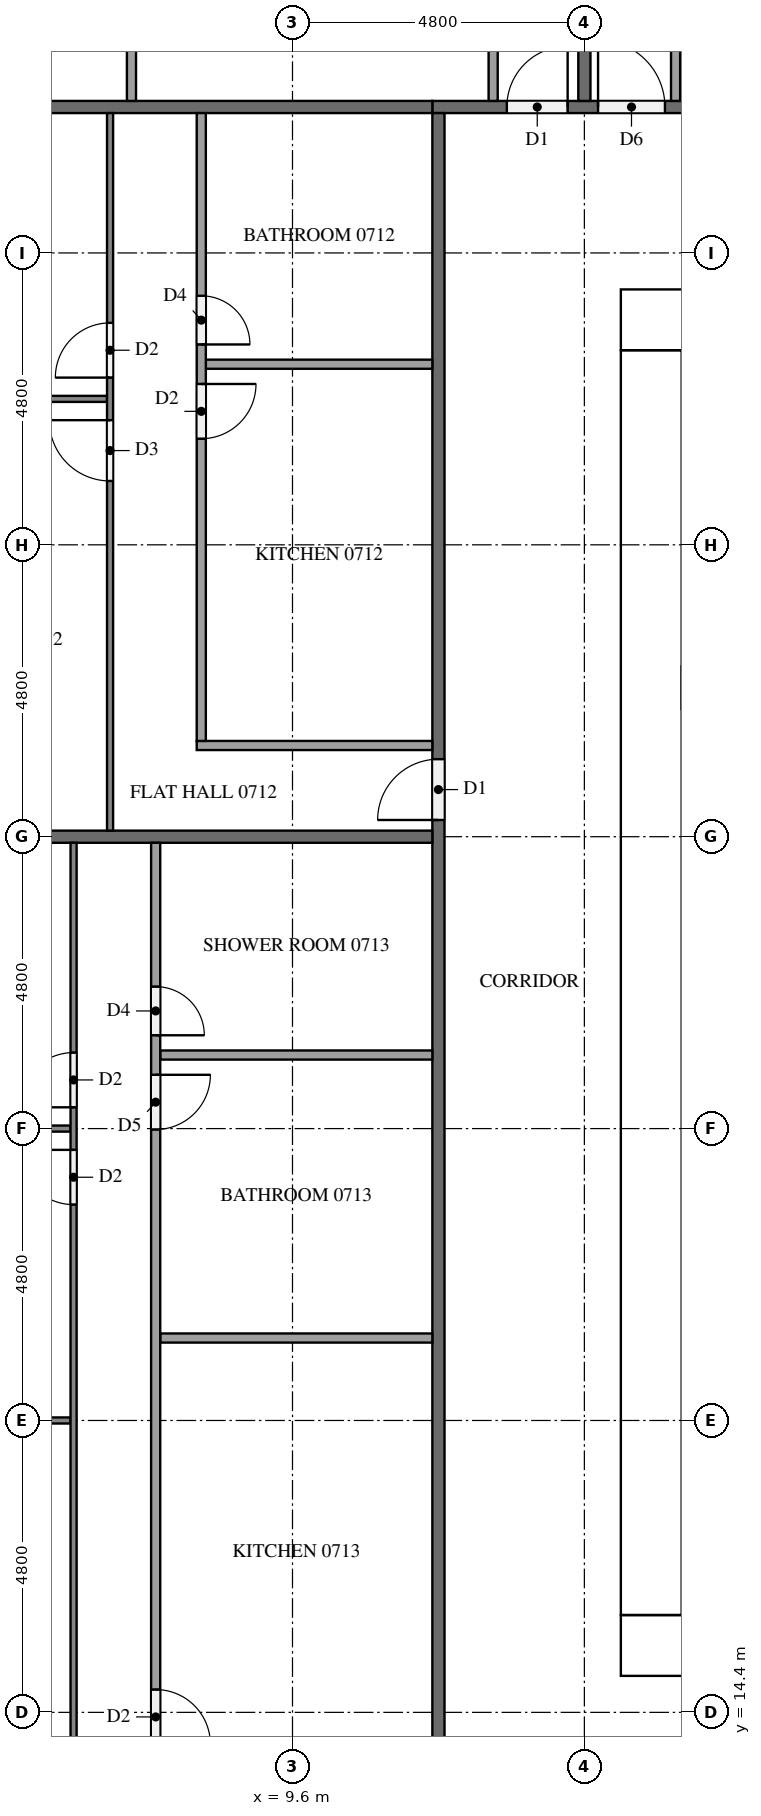
"""IFC4 building model, lengths in metres.
Left out: names, types, materials, properties, quantities, classifications, styles, units other than length and angle.
Written with IfcOpenShell. Run it as: python <this file> out.ifc"""

import sys

from ifc_helpers import new_model, si_unit, direction, frame, frame_2d, origin, place, context, subcontext, project, spatial, rectangle, extrude, element, fill, save


model = new_model("IFC4")
c1 = context("Model", 3, precision=1e-05, world=origin(), true_north=direction((0.0, 1.0)))
c2 = subcontext(c1, "Body", "Model", "MODEL_VIEW")
j1 = project(units=[si_unit("LENGTHUNIT", "METRE"), si_unit("PLANEANGLEUNIT", "RADIAN")], contexts=[c1])
p1 = place(None, origin())
s1 = spatial("IfcSite", under=j1, at=p1, CompositionType="ELEMENT")
p2 = place(p1, origin())
s2 = spatial("IfcBuilding", under=s1, at=p2, CompositionType="ELEMENT")
p3 = place(p2, frame((0.0, 0.0, 32.9)))
s3 = spatial("IfcBuildingStorey", under=s2, at=p3, CompositionType="ELEMENT", Elevation=32.9)
p4 = place(p3, frame((15.0, 15.5, 0.0), z_axis=(0.0, 0.0, 1.0), x_axis=(1.0, 0.0, 0.0)))
e1 = element("IfcWall", 1, at=p4, inside=s3, PredefinedType="SHEAR", context=c2, shape_type="SweptSolid", body=[
    extrude(rectangle(XDim=32.4, YDim=1.0, at=frame_2d((16.2, 0.0))), origin(), (0.0, 0.0, 1.0), 3.2),
])
p5 = place(p4, frame((15.3, 0.0, 0.0)))
e2 = element("IfcOpeningElement", 2, at=p5, cuts=e1, PredefinedType="OPENING", context=c2, shape_type="SweptSolid", body=[
    extrude(rectangle(XDim=1.8, YDim=2.1, at=frame_2d((0.9, 1.05))), frame((0.0, 0.51, 0.0), z_axis=(0.0, -1.0, 0.0), x_axis=(1.0, 0.0, 0.0)), (0.0, 0.0, 1.0), 1.02),
])
p6 = place(p3, frame((15.0, 37.3, 0.0), z_axis=(0.0, 0.0, 1.0), x_axis=(1.0, 0.0, 0.0)))
e3 = element("IfcWall", 3, at=p6, inside=s3, PredefinedType="SHEAR", context=c2, shape_type="SweptSolid", body=[
    extrude(rectangle(XDim=32.4, YDim=1.0, at=frame_2d((16.2, 0.0))), origin(), (0.0, 0.0, 1.0), 3.2),
])
p7 = place(p6, frame((15.3, 0.0, 0.0)))
e4 = element("IfcOpeningElement", 4, at=p7, cuts=e3, PredefinedType="OPENING", context=c2, shape_type="SweptSolid", body=[
    extrude(rectangle(XDim=1.8, YDim=2.1, at=frame_2d((0.9, 1.05))), frame((0.0, 0.51, 0.0), z_axis=(0.0, -1.0, 0.0), x_axis=(1.0, 0.0, 0.0)), (0.0, 0.0, 1.0), 1.02),
])
p8 = place(p6, frame((1.766, 0.0, 0.0)))
e5 = element("IfcOpeningElement", 5, at=p8, cuts=e3, PredefinedType="OPENING", context=c2, shape_type="SweptSolid", body=[
    extrude(rectangle(XDim=1.0, YDim=2.1, at=frame_2d((0.5, 1.05))), frame((0.0, 0.51, 0.0), z_axis=(0.0, -1.0, 0.0), x_axis=(1.0, 0.0, 0.0)), (0.0, 0.0, 1.0), 1.02),
])
p9 = place(p6, frame((5.241, 0.0, 0.0)))
e6 = element("IfcOpeningElement", 6, at=p9, cuts=e3, PredefinedType="OPENING", context=c2, shape_type="SweptSolid", body=[
    extrude(rectangle(XDim=1.0, YDim=2.1, at=frame_2d((0.5, 1.05))), frame((0.0, 0.51, 0.0), z_axis=(0.0, -1.0, 0.0), x_axis=(1.0, 0.0, 0.0)), (0.0, 0.0, 1.0), 1.02),
])
p10 = place(p3, frame((15.5, 16.0, 0.0), z_axis=(0.0, 0.0, 1.0), x_axis=(0.0, 1.0, 0.0)))
e7 = element("IfcWall", 7, at=p10, inside=s3, PredefinedType="SHEAR", context=c2, shape_type="SweptSolid", body=[
    extrude(rectangle(XDim=20.8, YDim=1.0, at=frame_2d((10.4, 0.0))), origin(), (0.0, 0.0, 1.0), 3.2),
])
p11 = place(p10, frame((4.76, 0.0, 0.0)))
e8 = element("IfcOpeningElement", 8, at=p11, cuts=e7, PredefinedType="OPENING", context=c2, shape_type="SweptSolid", body=[
    extrude(rectangle(XDim=1.2, YDim=2.1, at=frame_2d((0.6, 1.05))), frame((0.0, 0.51, 0.0), z_axis=(0.0, -1.0, 0.0), x_axis=(1.0, 0.0, 0.0)), (0.0, 0.0, 1.0), 1.02),
])
p12 = place(p3, frame((11.9, 40.8, 0.0), z_axis=(0.0, 0.0, 1.0), x_axis=(1.0, 0.0, 0.0)))
e9 = element("IfcWall", 9, at=p12, inside=s3, PredefinedType="PARTITIONING", context=c2, shape_type="SweptSolid", body=[
    extrude(rectangle(XDim=38.6, YDim=0.2, at=frame_2d((19.3, 0.0))), origin(), (0.0, 0.0, 1.0), 3.2),
])
p13 = place(p12, frame((37.225, 0.0, 0.0)))
e10 = element("IfcOpeningElement", 10, at=p13, cuts=e9, PredefinedType="OPENING", context=c2, shape_type="SweptSolid", body=[
    extrude(rectangle(XDim=1.0, YDim=2.1, at=frame_2d((0.5, 1.05))), frame((0.0, 0.11, 0.0), z_axis=(0.0, -1.0, 0.0), x_axis=(1.0, 0.0, 0.0)), (0.0, 0.0, 1.0), 0.22),
])
p14 = place(p12, frame((30.025, 0.0, 0.0)))
e11 = element("IfcOpeningElement", 11, at=p14, cuts=e9, PredefinedType="OPENING", context=c2, shape_type="SweptSolid", body=[
    extrude(rectangle(XDim=1.0, YDim=2.1, at=frame_2d((0.5, 1.05))), frame((0.0, 0.11, 0.0), z_axis=(0.0, -1.0, 0.0), x_axis=(1.0, 0.0, 0.0)), (0.0, 0.0, 1.0), 0.22),
])
p15 = place(p12, frame((2.725, 0.0, 0.0)))
e12 = element("IfcOpeningElement", 12, at=p15, cuts=e9, PredefinedType="OPENING", context=c2, shape_type="SweptSolid", body=[
    extrude(rectangle(XDim=1.1, YDim=2.1, at=frame_2d((0.55, 1.05))), frame((0.0, 0.11, 0.0), z_axis=(0.0, -1.0, 0.0), x_axis=(1.0, 0.0, 0.0)), (0.0, 0.0, 1.0), 0.22),
])
p16 = place(p12, frame((1.225, 0.0, 0.0)))
e13 = element("IfcOpeningElement", 13, at=p16, cuts=e9, PredefinedType="OPENING", context=c2, shape_type="SweptSolid", body=[
    extrude(rectangle(XDim=1.0, YDim=2.1, at=frame_2d((0.5, 1.05))), frame((0.0, 0.11, 0.0), z_axis=(0.0, -1.0, 0.0), x_axis=(1.0, 0.0, 0.0)), (0.0, 0.0, 1.0), 0.22),
])
p17 = place(p3, frame((12.0, 12.1, 0.0), z_axis=(0.0, 0.0, 1.0), x_axis=(0.0, 1.0, 0.0)))
e14 = element("IfcWall", 14, at=p17, inside=s3, PredefinedType="PARTITIONING", context=c2, shape_type="SweptSolid", body=[
    extrude(rectangle(XDim=28.6, YDim=0.2, at=frame_2d((14.3, 0.0))), origin(), (0.0, 0.0, 1.0), 3.2),
])
p18 = place(p17, frame((16.975, 0.0, 0.0)))
e15 = element("IfcOpeningElement", 15, at=p18, cuts=e14, PredefinedType="OPENING", context=c2, shape_type="SweptSolid", body=[
    extrude(rectangle(XDim=1.0, YDim=2.1, at=frame_2d((0.5, 1.05))), frame((0.0, 0.11, 0.0), z_axis=(0.0, -1.0, 0.0), x_axis=(1.0, 0.0, 0.0)), (0.0, 0.0, 1.0), 0.22),
])
p19 = place(p17, frame((0.175, 0.0, 0.0)))
e16 = element("IfcOpeningElement", 16, at=p19, cuts=e14, PredefinedType="OPENING", context=c2, shape_type="SweptSolid", body=[
    extrude(rectangle(XDim=1.0, YDim=2.1, at=frame_2d((0.5, 1.05))), frame((0.0, 0.11, 0.0), z_axis=(0.0, -1.0, 0.0), x_axis=(1.0, 0.0, 0.0)), (0.0, 0.0, 1.0), 0.22),
])
p20 = place(p3, frame((14.4, 47.55, 0.0), z_axis=(0.0, 0.0, 1.0), x_axis=(0.0, -1.0, 0.0)))
e17 = element("IfcWall", 17, at=p20, inside=s3, PredefinedType="PARTITIONING", context=c2, shape_type="SweptSolid", body=[
    extrude(rectangle(XDim=6.65, YDim=0.2, at=frame_2d((3.325, 0.0))), origin(), (0.0, 0.0, 1.0), 3.2),
])
for number, where, z_axis, x_axis in (
    (18, (0.1, 40.8, 0.0), (0.0, 0.0, 1.0), (1.0, 0.0, 0.0)),
    (19, (0.1, 28.8, 0.0), (0.0, 0.0, 1.0), (1.0, 0.0, 0.0)),
):
    element("IfcWall", number, at=place(p3, frame(where, z_axis=z_axis, x_axis=x_axis)), inside=s3, PredefinedType="PARTITIONING", context=c2, shape_type="SweptSolid", body=[
        extrude(rectangle(XDim=11.8, YDim=0.2, at=frame_2d((5.9, 0.0))), origin(), (0.0, 0.0, 1.0), 3.2),
    ])
p21 = place(p3, frame((15.9, 40.9, 0.0), z_axis=(0.0, 0.0, 1.0), x_axis=(0.0, 1.0, 0.0)))
e20 = element("IfcWall", 20, at=p21, inside=s3, PredefinedType="PARTITIONING", context=c2, shape_type="SweptSolid", body=[
    extrude(rectangle(XDim=2.225, YDim=0.15, at=frame_2d((1.113, 0.0))), origin(), (0.0, 0.0, 1.0), 3.2),
])
p22 = place(p3, frame((6.952, 40.9, 0.0), z_axis=(0.0, 0.0, 1.0), x_axis=(0.0, 1.0, 0.0)))
e21 = element("IfcWall", 21, at=p22, inside=s3, PredefinedType="PARTITIONING", context=c2, shape_type="SweptSolid", body=[
    extrude(rectangle(XDim=1.925, YDim=0.15, at=frame_2d((0.962, 0.0))), origin(), (0.0, 0.0, 1.0), 3.2),
])
p23 = place(p3, frame((12.9, 40.9, 0.0), z_axis=(0.0, 0.0, 1.0), x_axis=(0.0, 1.0, 0.0)))
e22 = element("IfcWall", 22, at=p23, inside=s3, PredefinedType="PARTITIONING", context=c2, shape_type="SweptSolid", body=[
    extrude(rectangle(XDim=2.075, YDim=0.15, at=frame_2d((1.038, 0.0))), origin(), (0.0, 0.0, 1.0), 3.2),
])
p24 = place(p3, frame((6.55, 36.0, 0.0), z_axis=(0.0, 0.0, 1.0), x_axis=(-1.0, 0.0, 0.0)))
e23 = element("IfcWall", 23, at=p24, inside=s3, PredefinedType="PARTITIONING", context=c2, shape_type="SweptSolid", body=[
    extrude(rectangle(XDim=6.45, YDim=0.1, at=frame_2d((3.225, 0.0))), origin(), (0.0, 0.0, 1.0), 3.2),
])
p25 = place(p3, frame((6.6, 28.9, 0.0), z_axis=(0.0, 0.0, 1.0), x_axis=(0.0, 1.0, 0.0)))
e24 = element("IfcWall", 24, at=p25, inside=s3, PredefinedType="PARTITIONING", context=c2, shape_type="SweptSolid", body=[
    extrude(rectangle(XDim=11.8, YDim=0.1, at=frame_2d((5.9, 0.0))), origin(), (0.0, 0.0, 1.0), 3.2),
])
p26 = place(p25, frame((5.75, 0.0, 0.0)))
e25 = element("IfcOpeningElement", 25, at=p26, cuts=e24, PredefinedType="OPENING", context=c2, shape_type="SweptSolid", body=[
    extrude(rectangle(XDim=1.0, YDim=2.1, at=frame_2d((0.5, 1.05))), frame((0.0, 0.06, 0.0), z_axis=(0.0, -1.0, 0.0), x_axis=(1.0, 0.0, 0.0)), (0.0, 0.0, 1.0), 0.12),
])
p27 = place(p25, frame((7.45, 0.0, 0.0)))
e26 = element("IfcOpeningElement", 26, at=p27, cuts=e24, PredefinedType="OPENING", context=c2, shape_type="SweptSolid", body=[
    extrude(rectangle(XDim=0.9, YDim=2.1, at=frame_2d((0.45, 1.05))), frame((0.0, 0.06, 0.0), z_axis=(0.0, -1.0, 0.0), x_axis=(1.0, 0.0, 0.0)), (0.0, 0.0, 1.0), 0.12),
])
p28 = place(p3, frame((11.9, 36.57, 0.0), z_axis=(0.0, 0.0, 1.0), x_axis=(-1.0, 0.0, 0.0)))
e27 = element("IfcWall", 27, at=p28, inside=s3, PredefinedType="PARTITIONING", context=c2, shape_type="SweptSolid", body=[
    extrude(rectangle(XDim=3.725, YDim=0.15, at=frame_2d((1.862, 0.0))), origin(), (0.0, 0.0, 1.0), 3.2),
])
p29 = place(p3, frame((11.9, 30.3, 0.0), z_axis=(0.0, 0.0, 1.0), x_axis=(-1.0, 0.0, 0.0)))
e28 = element("IfcWall", 28, at=p29, inside=s3, PredefinedType="PARTITIONING", context=c2, shape_type="SweptSolid", body=[
    extrude(rectangle(XDim=3.875, YDim=0.15, at=frame_2d((1.938, 0.0))), origin(), (0.0, 0.0, 1.0), 3.2),
])
p30 = place(p3, frame((8.1, 40.7, 0.0), z_axis=(0.0, 0.0, 1.0), x_axis=(0.0, -1.0, 0.0)))
e29 = element("IfcWall", 29, at=p30, inside=s3, PredefinedType="PARTITIONING", context=c2, shape_type="SweptSolid", body=[
    extrude(rectangle(XDim=10.325, YDim=0.15, at=frame_2d((5.163, 0.0))), origin(), (0.0, 0.0, 1.0), 3.2),
])
p31 = place(p30, frame((4.455, 0.0, 0.0)))
e30 = element("IfcOpeningElement", 30, at=p31, cuts=e29, PredefinedType="OPENING", context=c2, shape_type="SweptSolid", body=[
    extrude(rectangle(XDim=0.9, YDim=2.1, at=frame_2d((0.45, 1.05))), frame((0.0, 0.085, 0.0), z_axis=(0.0, -1.0, 0.0), x_axis=(1.0, 0.0, 0.0)), (0.0, 0.0, 1.0), 0.17),
])
p32 = place(p30, frame((3.005, 0.0, 0.0)))
e31 = element("IfcOpeningElement", 31, at=p32, cuts=e29, PredefinedType="OPENING", context=c2, shape_type="SweptSolid", body=[
    extrude(rectangle(XDim=0.8, YDim=2.1, at=frame_2d((0.4, 1.05))), frame((0.0, 0.085, 0.0), z_axis=(0.0, -1.0, 0.0), x_axis=(1.0, 0.0, 0.0)), (0.0, 0.0, 1.0), 0.17),
])
p33 = place(p3, frame((5.95, 19.2, 0.0), z_axis=(0.0, 0.0, 1.0), x_axis=(-1.0, 0.0, 0.0)))
e32 = element("IfcWall", 32, at=p33, inside=s3, PredefinedType="PARTITIONING", context=c2, shape_type="SweptSolid", body=[
    extrude(rectangle(XDim=5.85, YDim=0.1, at=frame_2d((2.925, 0.0))), origin(), (0.0, 0.0, 1.0), 3.2),
])
p34 = place(p3, frame((5.95, 24.0, 0.0), z_axis=(0.0, 0.0, 1.0), x_axis=(-1.0, 0.0, 0.0)))
e33 = element("IfcWall", 33, at=p34, inside=s3, PredefinedType="PARTITIONING", context=c2, shape_type="SweptSolid", body=[
    extrude(rectangle(XDim=5.5, YDim=0.1, at=frame_2d((2.75, 0.0))), origin(), (0.0, 0.0, 1.0), 3.2),
])
p35 = place(p3, frame((6.0, 12.1, 0.0), z_axis=(0.0, 0.0, 1.0), x_axis=(0.0, 1.0, 0.0)))
e34 = element("IfcWall", 34, at=p35, inside=s3, PredefinedType="PARTITIONING", context=c2, shape_type="SweptSolid", body=[
    extrude(rectangle(XDim=16.6, YDim=0.1, at=frame_2d((8.3, 0.0))), origin(), (0.0, 0.0, 1.0), 3.2),
])
p36 = place(p35, frame((0.3, 0.0, 0.0)))
e35 = element("IfcOpeningElement", 35, at=p36, cuts=e34, PredefinedType="OPENING", context=c2, shape_type="SweptSolid", body=[
    extrude(rectangle(XDim=1.0, YDim=2.1, at=frame_2d((0.5, 1.05))), frame((0.0, 0.06, 0.0), z_axis=(0.0, -1.0, 0.0), x_axis=(1.0, 0.0, 0.0)), (0.0, 0.0, 1.0), 0.12),
])
p37 = place(p35, frame((10.65, 0.0, 0.0)))
e36 = element("IfcOpeningElement", 36, at=p37, cuts=e34, PredefinedType="OPENING", context=c2, shape_type="SweptSolid", body=[
    extrude(rectangle(XDim=0.9, YDim=2.1, at=frame_2d((0.45, 1.05))), frame((0.0, 0.06, 0.0), z_axis=(0.0, -1.0, 0.0), x_axis=(1.0, 0.0, 0.0)), (0.0, 0.0, 1.0), 0.12),
])
p38 = place(p35, frame((12.25, 0.0, 0.0)))
e37 = element("IfcOpeningElement", 37, at=p38, cuts=e34, PredefinedType="OPENING", context=c2, shape_type="SweptSolid", body=[
    extrude(rectangle(XDim=0.9, YDim=2.1, at=frame_2d((0.45, 1.05))), frame((0.0, 0.06, 0.0), z_axis=(0.0, -1.0, 0.0), x_axis=(1.0, 0.0, 0.0)), (0.0, 0.0, 1.0), 0.12),
])
for number, where, z_axis, x_axis in (
    (38, (11.9, 20.556, 0.0), (0.0, 0.0, 1.0), (-1.0, 0.0, 0.0)),
    (39, (11.9, 25.21, 0.0), (0.0, 0.0, 1.0), (-1.0, 0.0, 0.0)),
):
    element("IfcWall", number, at=place(p3, frame(where, z_axis=z_axis, x_axis=x_axis)), inside=s3, PredefinedType="PARTITIONING", context=c2, shape_type="SweptSolid", body=[
        extrude(rectangle(XDim=4.475, YDim=0.15, at=frame_2d((2.237, 0.0))), origin(), (0.0, 0.0, 1.0), 3.2),
    ])
p39 = place(p3, frame((7.35, 28.7, 0.0), z_axis=(0.0, 0.0, 1.0), x_axis=(0.0, -1.0, 0.0)))
e40 = element("IfcWall", 40, at=p39, inside=s3, PredefinedType="PARTITIONING", context=c2, shape_type="SweptSolid", body=[
    extrude(rectangle(XDim=15.125, YDim=0.15, at=frame_2d((7.562, 0.0))), origin(), (0.0, 0.0, 1.0), 3.2),
])
p40 = place(p39, frame((13.925, 0.0, 0.0)))
e41 = element("IfcOpeningElement", 41, at=p40, cuts=e40, PredefinedType="OPENING", context=c2, shape_type="SweptSolid", body=[
    extrude(rectangle(XDim=0.9, YDim=2.1, at=frame_2d((0.45, 1.05))), frame((0.0, 0.085, 0.0), z_axis=(0.0, -1.0, 0.0), x_axis=(1.0, 0.0, 0.0)), (0.0, 0.0, 1.0), 0.17),
])
p41 = place(p39, frame((3.815, 0.0, 0.0)))
e42 = element("IfcOpeningElement", 42, at=p41, cuts=e40, PredefinedType="OPENING", context=c2, shape_type="SweptSolid", body=[
    extrude(rectangle(XDim=0.9, YDim=2.1, at=frame_2d((0.45, 1.05))), frame((0.0, 0.085, 0.0), z_axis=(0.0, -1.0, 0.0), x_axis=(1.0, 0.0, 0.0)), (0.0, 0.0, 1.0), 0.17),
])
p42 = place(p39, frame((2.365, 0.0, 0.0)))
e43 = element("IfcOpeningElement", 43, at=p42, cuts=e40, PredefinedType="OPENING", context=c2, shape_type="SweptSolid", body=[
    extrude(rectangle(XDim=0.8, YDim=2.1, at=frame_2d((0.4, 1.05))), frame((0.0, 0.085, 0.0), z_axis=(0.0, -1.0, 0.0), x_axis=(1.0, 0.0, 0.0)), (0.0, 0.0, 1.0), 0.17),
])
p43 = place(p11, frame((1.2, 0.0, 0.0), z_axis=(0.0, 0.0, 1.0), x_axis=(-1.0, 0.0, 0.0)))
e44 = element("IfcDoor", 44, at=p43, inside=s3, OperationType="SINGLE_SWING_RIGHT", PredefinedType="DOOR", context=c2, shape_type="SweptSolid", body=[
    extrude(rectangle(XDim=1.2, YDim=2.1, at=frame_2d((0.6, 1.05))), frame((0.0, 0.025, 0.0), z_axis=(0.0, -1.0, 0.0), x_axis=(1.0, 0.0, 0.0)), (0.0, 0.0, 1.0), 0.05),
])
fill(e8, e44)
p44 = place(p15, origin())
e45 = element("IfcDoor", 45, at=p44, inside=s3, OperationType="SINGLE_SWING_LEFT", PredefinedType="DOOR", context=c2, shape_type="SweptSolid", body=[
    extrude(rectangle(XDim=1.1, YDim=2.1, at=frame_2d((0.55, 1.05))), frame((0.0, 0.025, 0.0), z_axis=(0.0, -1.0, 0.0), x_axis=(1.0, 0.0, 0.0)), (0.0, 0.0, 1.0), 0.05),
])
fill(e12, e45)
p45 = place(p16, origin())
e46 = element("IfcDoor", 46, at=p45, inside=s3, OperationType="SINGLE_SWING_RIGHT", PredefinedType="DOOR", context=c2, shape_type="SweptSolid", body=[
    extrude(rectangle(XDim=1.0, YDim=2.1, at=frame_2d((0.5, 1.05))), frame((0.0, 0.025, 0.0), z_axis=(0.0, -1.0, 0.0), x_axis=(1.0, 0.0, 0.0)), (0.0, 0.0, 1.0), 0.05),
])
fill(e13, e46)
p46 = place(p18, origin())
e47 = element("IfcDoor", 47, at=p46, inside=s3, OperationType="SINGLE_SWING_LEFT", PredefinedType="DOOR", context=c2, shape_type="SweptSolid", body=[
    extrude(rectangle(XDim=1.0, YDim=2.1, at=frame_2d((0.5, 1.05))), frame((0.0, 0.025, 0.0), z_axis=(0.0, -1.0, 0.0), x_axis=(1.0, 0.0, 0.0)), (0.0, 0.0, 1.0), 0.05),
])
fill(e15, e47)
p47 = place(p26, origin())
e48 = element("IfcDoor", 48, at=p47, inside=s3, OperationType="SINGLE_SWING_RIGHT", PredefinedType="DOOR", context=c2, shape_type="SweptSolid", body=[
    extrude(rectangle(XDim=1.0, YDim=2.1, at=frame_2d((0.5, 1.05))), frame((0.0, 0.025, 0.0), z_axis=(0.0, -1.0, 0.0), x_axis=(1.0, 0.0, 0.0)), (0.0, 0.0, 1.0), 0.05),
])
fill(e25, e48)
p48 = place(p27, origin())
e49 = element("IfcDoor", 49, at=p48, inside=s3, OperationType="SINGLE_SWING_LEFT", PredefinedType="DOOR", context=c2, shape_type="SweptSolid", body=[
    extrude(rectangle(XDim=0.9, YDim=2.1, at=frame_2d((0.45, 1.05))), frame((0.0, 0.025, 0.0), z_axis=(0.0, -1.0, 0.0), x_axis=(1.0, 0.0, 0.0)), (0.0, 0.0, 1.0), 0.05),
])
fill(e26, e49)
p49 = place(p31, origin())
e50 = element("IfcDoor", 50, at=p49, inside=s3, OperationType="SINGLE_SWING_LEFT", PredefinedType="DOOR", context=c2, shape_type="SweptSolid", body=[
    extrude(rectangle(XDim=0.9, YDim=2.1, at=frame_2d((0.45, 1.05))), frame((0.0, 0.025, 0.0), z_axis=(0.0, -1.0, 0.0), x_axis=(1.0, 0.0, 0.0)), (0.0, 0.0, 1.0), 0.05),
])
fill(e30, e50)
p50 = place(p32, origin())
e51 = element("IfcDoor", 51, at=p50, inside=s3, OperationType="SINGLE_SWING_RIGHT", PredefinedType="DOOR", context=c2, shape_type="SweptSolid", body=[
    extrude(rectangle(XDim=0.8, YDim=2.1, at=frame_2d((0.4, 1.05))), frame((0.0, 0.025, 0.0), z_axis=(0.0, -1.0, 0.0), x_axis=(1.0, 0.0, 0.0)), (0.0, 0.0, 1.0), 0.05),
])
fill(e31, e51)
p51 = place(p37, origin())
e52 = element("IfcDoor", 52, at=p51, inside=s3, OperationType="SINGLE_SWING_RIGHT", PredefinedType="DOOR", context=c2, shape_type="SweptSolid", body=[
    extrude(rectangle(XDim=0.9, YDim=2.1, at=frame_2d((0.45, 1.05))), frame((0.0, 0.025, 0.0), z_axis=(0.0, -1.0, 0.0), x_axis=(1.0, 0.0, 0.0)), (0.0, 0.0, 1.0), 0.05),
])
fill(e36, e52)
p52 = place(p38, origin())
e53 = element("IfcDoor", 53, at=p52, inside=s3, OperationType="SINGLE_SWING_LEFT", PredefinedType="DOOR", context=c2, shape_type="SweptSolid", body=[
    extrude(rectangle(XDim=0.9, YDim=2.1, at=frame_2d((0.45, 1.05))), frame((0.0, 0.025, 0.0), z_axis=(0.0, -1.0, 0.0), x_axis=(1.0, 0.0, 0.0)), (0.0, 0.0, 1.0), 0.05),
])
fill(e37, e53)
p53 = place(p40, origin())
e54 = element("IfcDoor", 54, at=p53, inside=s3, OperationType="SINGLE_SWING_RIGHT", PredefinedType="DOOR", context=c2, shape_type="SweptSolid", body=[
    extrude(rectangle(XDim=0.9, YDim=2.1, at=frame_2d((0.45, 1.05))), frame((0.0, 0.025, 0.0), z_axis=(0.0, -1.0, 0.0), x_axis=(1.0, 0.0, 0.0)), (0.0, 0.0, 1.0), 0.05),
])
fill(e41, e54)
p54 = place(p41, origin())
e55 = element("IfcDoor", 55, at=p54, inside=s3, OperationType="SINGLE_SWING_LEFT", PredefinedType="DOOR", context=c2, shape_type="SweptSolid", body=[
    extrude(rectangle(XDim=0.9, YDim=2.1, at=frame_2d((0.45, 1.05))), frame((0.0, 0.025, 0.0), z_axis=(0.0, -1.0, 0.0), x_axis=(1.0, 0.0, 0.0)), (0.0, 0.0, 1.0), 0.05),
])
fill(e42, e55)
p55 = place(p42, origin())
e56 = element("IfcDoor", 56, at=p55, inside=s3, OperationType="SINGLE_SWING_RIGHT", PredefinedType="DOOR", context=c2, shape_type="SweptSolid", body=[
    extrude(rectangle(XDim=0.8, YDim=2.1, at=frame_2d((0.4, 1.05))), frame((0.0, 0.025, 0.0), z_axis=(0.0, -1.0, 0.0), x_axis=(1.0, 0.0, 0.0)), (0.0, 0.0, 1.0), 0.05),
])
fill(e43, e56)
save(model, sys.argv[1])
